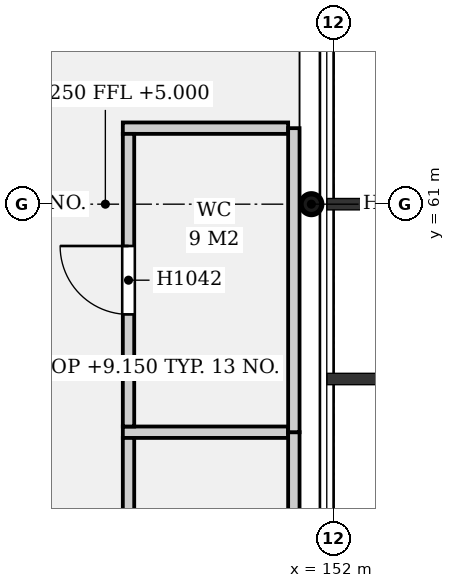
"""IFC4 building model, lengths in metres.
Left out: names, types, materials, properties, quantities, classifications, styles, units other than length and angle.
Written with IfcOpenShell. Run it as: python <this file> out.ifc"""

import sys

from ifc_helpers import new_model, si_unit, direction, frame, frame_2d, origin, origin_2d, place, context, subcontext, project, spatial, rectangle, hollow_circle, extrude, element, fill, save


model = new_model("IFC4")
c1 = context("Model", 3, precision=1e-05, world=origin(), true_north=direction((0.0, 1.0)))
c2 = subcontext(c1, "Body", "Model", "MODEL_VIEW")
j1 = project(units=[si_unit("LENGTHUNIT", "METRE"), si_unit("PLANEANGLEUNIT", "RADIAN")], contexts=[c1])
p1 = place(None, origin())
s1 = spatial("IfcSite", under=j1, at=p1, CompositionType="ELEMENT")
p2 = place(p1, origin())
s2 = spatial("IfcBuilding", under=s1, at=p2, CompositionType="ELEMENT")
p3 = place(p2, frame((0.0, 0.0, 5.0)))
s3 = spatial("IfcBuildingStorey", under=s2, at=p3, CompositionType="ELEMENT", Elevation=5.0)
p4 = place(p3, frame((151.706, 61.0, 0.027), z_axis=(0.19937683017, 0.0, 0.979922894717), x_axis=(0.0, 1.0, 0.0)))
e1 = element("IfcColumn", 1, at=p4, inside=s3, PredefinedType="COLUMN", context=c2, shape_type="SweptSolid", body=[
    extrude(hollow_circle(Radius=0.136, WallThickness=0.013, at=origin_2d()), origin(), (0.0, 0.0, 1.0), 4.462),
])
p5 = place(p3, frame((149.3, 50.075, 0.0), z_axis=(0.0, 0.0, 1.0), x_axis=(0.0, 1.0, 0.0)))
e2 = element("IfcWall", 2, at=p5, inside=s3, PredefinedType="PARTITIONING", context=c2, shape_type="SweptSolid", body=[
    extrude(rectangle(XDim=7.85, YDim=0.15, at=frame_2d((3.925, 0.0))), origin(), (0.0, 0.0, 1.0), 4.15),
])
p6 = place(p5, frame((3.475, 0.0, 0.0)))
e3 = element("IfcOpeningElement", 3, at=p6, cuts=e2, PredefinedType="OPENING", context=c2, shape_type="SweptSolid", body=[
    extrude(rectangle(XDim=0.9, YDim=2.1, at=frame_2d((0.45, 1.05))), frame((0.0, 0.085, 0.0), z_axis=(0.0, -1.0, 0.0), x_axis=(1.0, 0.0, 0.0)), (0.0, 0.0, 1.0), 0.17),
])
p7 = place(p3, frame((151.4, 58.0, 0.0), z_axis=(0.0, 0.0, 1.0), x_axis=(-1.0, 0.0, 0.0)))
e4 = element("IfcWall", 4, at=p7, inside=s3, PredefinedType="PARTITIONING", context=c2, shape_type="SweptSolid", body=[
    extrude(rectangle(XDim=2.175, YDim=0.15, at=frame_2d((1.087, 0.0))), origin(), (0.0, 0.0, 1.0), 4.15),
])
p8 = place(p3, frame((151.475, 50.0, 0.0), z_axis=(0.0, 0.0, 1.0), x_axis=(0.0, 1.0, 0.0)))
e5 = element("IfcWall", 5, at=p8, inside=s3, PredefinedType="PARTITIONING", context=c2, shape_type="SweptSolid", body=[
    extrude(rectangle(XDim=8.0, YDim=0.15, at=frame_2d((4.0, 0.0))), origin(), (0.0, 0.0, 1.0), 4.15),
])
p9 = place(p3, frame((149.3, 58.075, 0.0), z_axis=(0.0, 0.0, 1.0), x_axis=(0.0, 1.0, 0.0)))
e6 = element("IfcWall", 6, at=p9, inside=s3, PredefinedType="PARTITIONING", context=c2, shape_type="SweptSolid", body=[
    extrude(rectangle(XDim=3.85, YDim=0.15, at=frame_2d((1.925, 0.0))), origin(), (0.0, 0.0, 1.0), 4.15),
])
p10 = place(p9, frame((1.475, 0.0, 0.0)))
e7 = element("IfcOpeningElement", 7, at=p10, cuts=e6, PredefinedType="OPENING", context=c2, shape_type="SweptSolid", body=[
    extrude(rectangle(XDim=0.9, YDim=2.1, at=frame_2d((0.45, 1.05))), frame((0.0, 0.085, 0.0), z_axis=(0.0, -1.0, 0.0), x_axis=(1.0, 0.0, 0.0)), (0.0, 0.0, 1.0), 0.17),
])
p11 = place(p3, frame((151.4, 62.0, 0.0), z_axis=(0.0, 0.0, 1.0), x_axis=(-1.0, 0.0, 0.0)))
e8 = element("IfcWall", 8, at=p11, inside=s3, PredefinedType="PARTITIONING", context=c2, shape_type="SweptSolid", body=[
    extrude(rectangle(XDim=2.175, YDim=0.15, at=frame_2d((1.087, 0.0))), origin(), (0.0, 0.0, 1.0), 4.15),
])
p12 = place(p3, frame((151.475, 58.0, 0.0), z_axis=(0.0, 0.0, 1.0), x_axis=(0.0, 1.0, 0.0)))
e9 = element("IfcWall", 9, at=p12, inside=s3, PredefinedType="PARTITIONING", context=c2, shape_type="SweptSolid", body=[
    extrude(rectangle(XDim=4.0, YDim=0.15, at=frame_2d((2.0, 0.0))), origin(), (0.0, 0.0, 1.0), 4.15),
])
p13 = place(p10, origin())
e10 = element("IfcDoor", 10, at=p13, inside=s3, OperationType="SINGLE_SWING_RIGHT", PredefinedType="DOOR", context=c2, shape_type="SweptSolid", body=[
    extrude(rectangle(XDim=0.9, YDim=2.1, at=frame_2d((0.45, 1.05))), frame((0.0, 0.025, 0.0), z_axis=(0.0, -1.0, 0.0), x_axis=(1.0, 0.0, 0.0)), (0.0, 0.0, 1.0), 0.05),
])
fill(e7, e10)
save(model, sys.argv[1])
